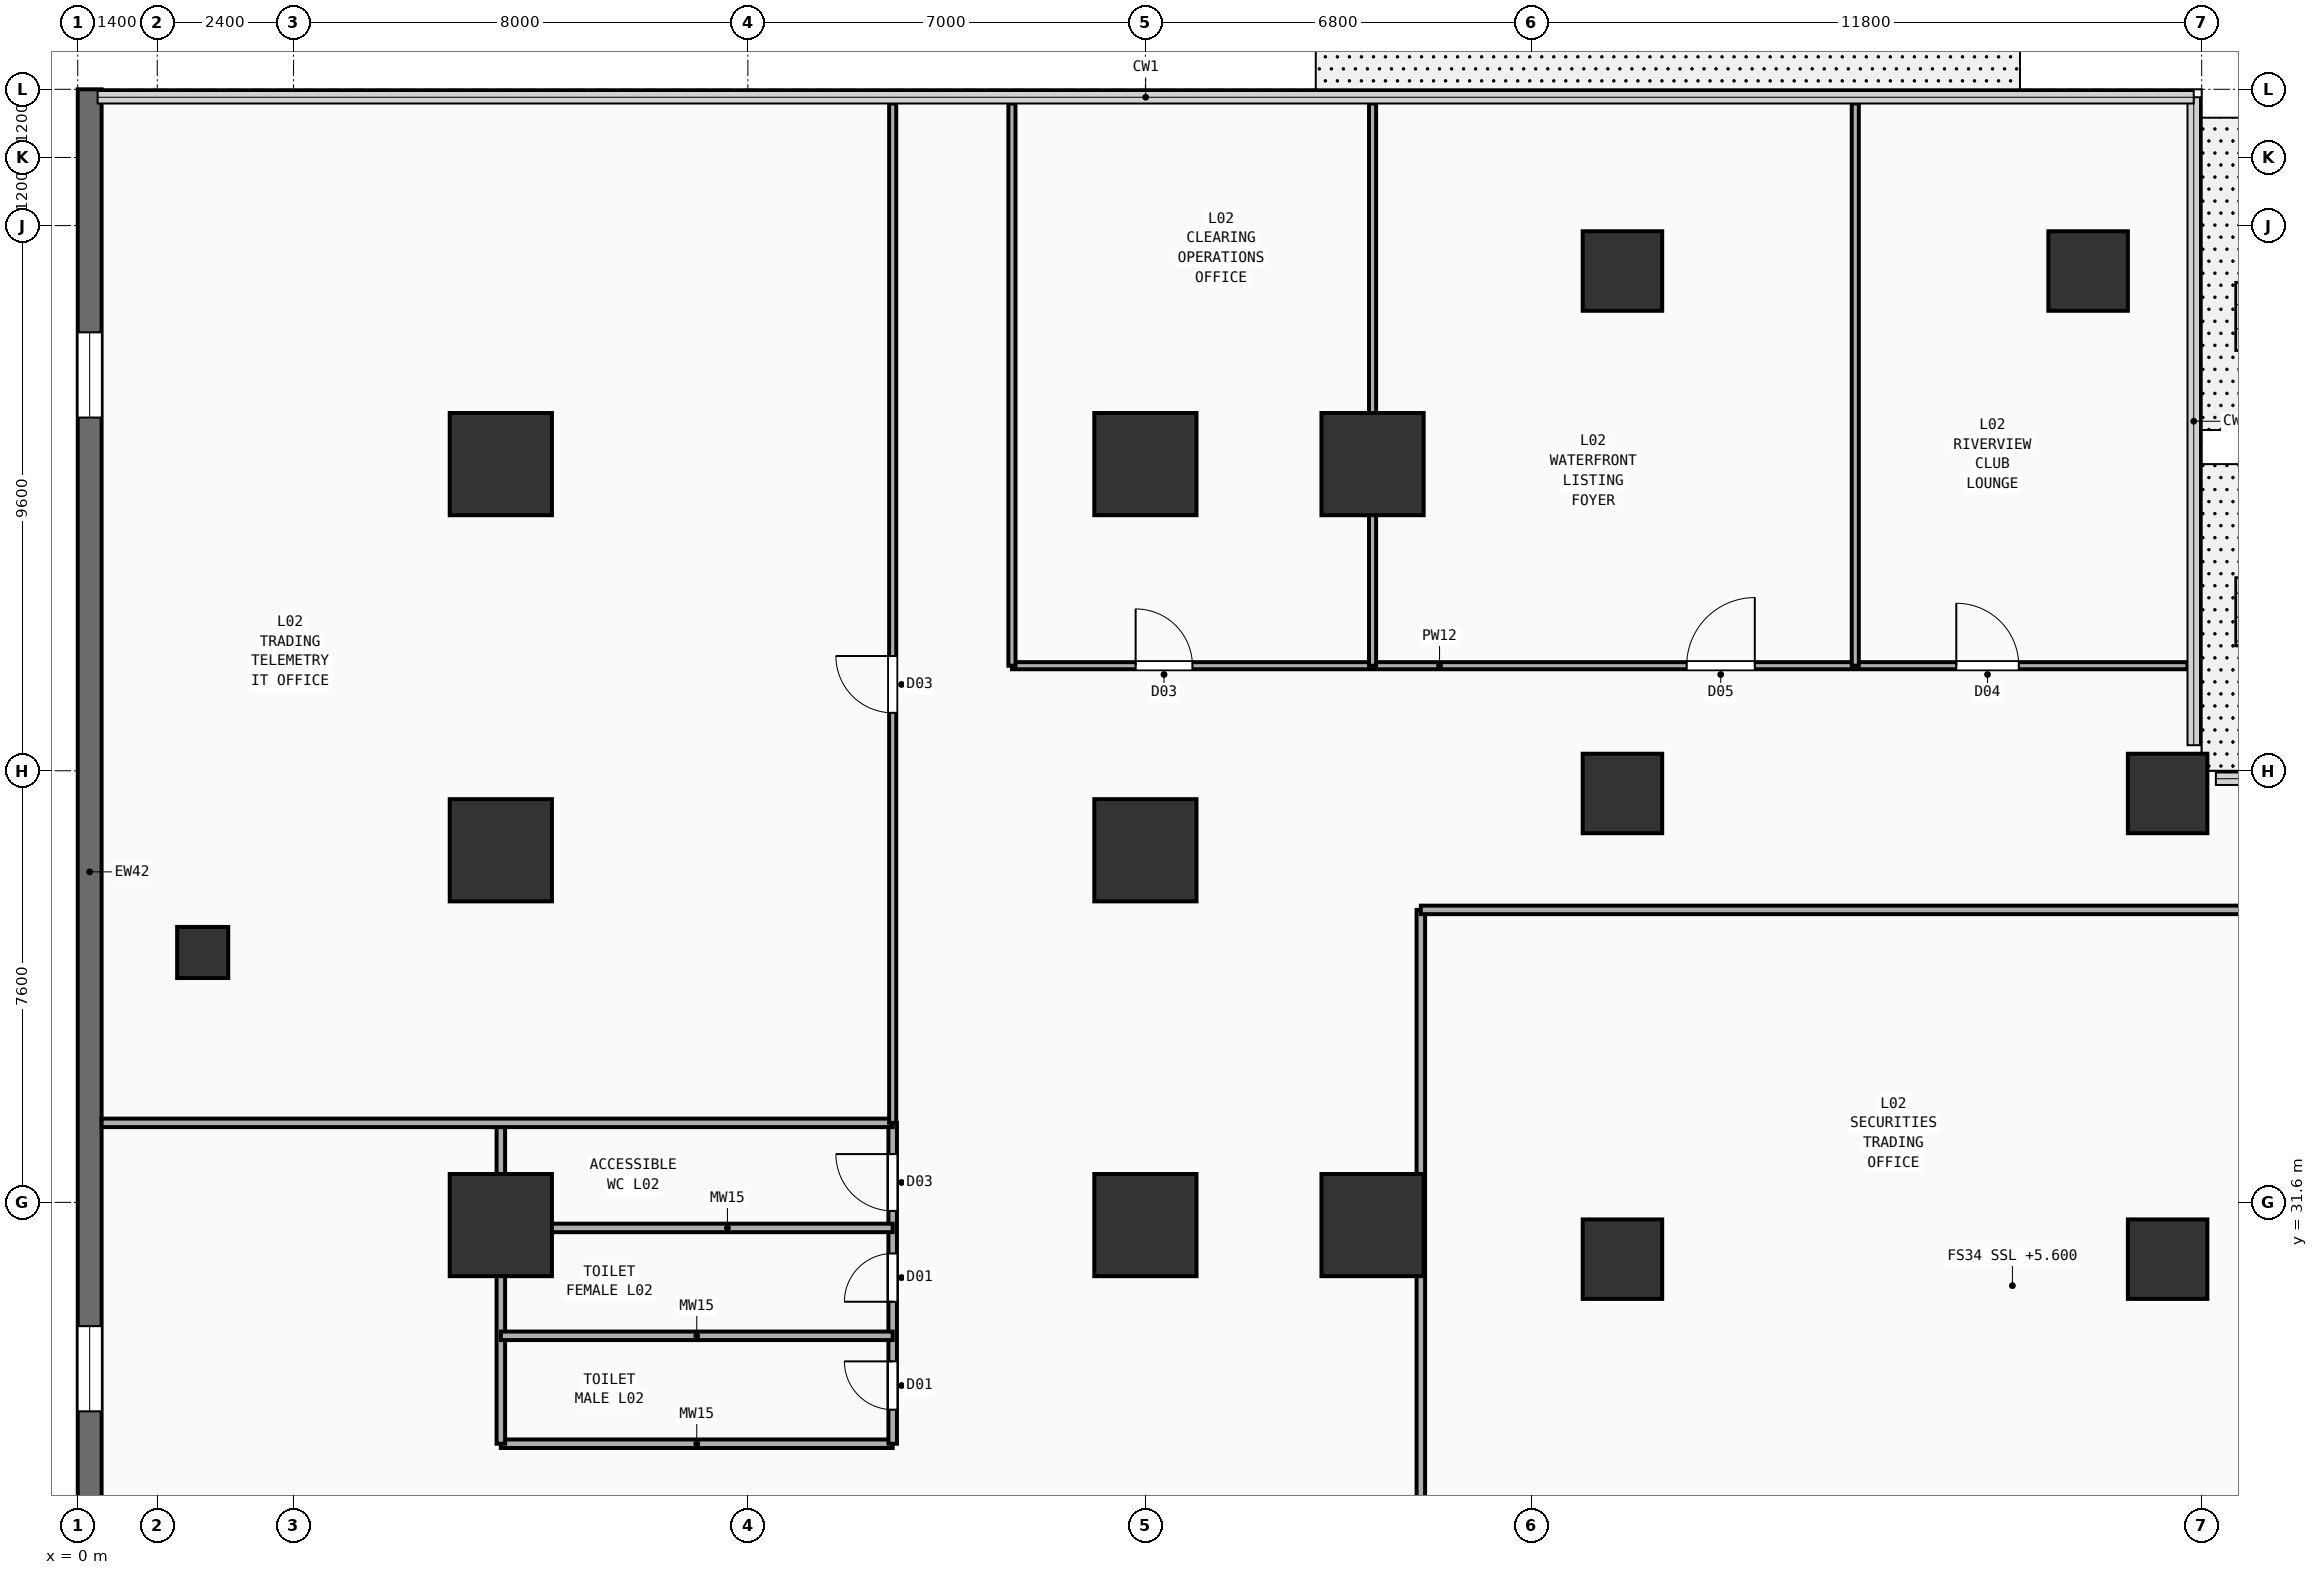
"""IFC4 building model, lengths in metres.
Left out: names, types, materials, properties, quantities, classifications, styles, units other than length and angle.
Written with IfcOpenShell. Run it as: python <this file> out.ifc"""

import sys

from ifc_helpers import new_model, si_unit, direction, frame, frame_2d, origin, origin_2d, place, context, subcontext, project, spatial, rectangle, extrude, element, fill, save


model = new_model("IFC4")
c1 = context("Model", 3, precision=1e-05, world=origin(), true_north=direction((0.0, 1.0)))
c2 = subcontext(c1, "Body", "Model", "MODEL_VIEW")
j1 = project(units=[si_unit("LENGTHUNIT", "METRE"), si_unit("PLANEANGLEUNIT", "RADIAN")], contexts=[c1])
p1 = place(None, origin())
s1 = spatial("IfcSite", under=j1, at=p1, CompositionType="ELEMENT")
p2 = place(p1, origin())
s2 = spatial("IfcBuilding", under=s1, at=p2, CompositionType="ELEMENT")
p3 = place(p2, frame((0.0, 0.0, 5.6)))
s3 = spatial("IfcBuildingStorey", under=s2, at=p3, CompositionType="ELEMENT", Elevation=5.6)
for number, where, z_axis, x_axis in (
    (1, (7.45, 31.2, 0.0), (0.0, 0.0, 1.0), (1.0, 0.0, 0.0)),
    (2, (7.45, 37.8, 0.0), (0.0, 0.0, 1.0), (1.0, 0.0, 0.0)),
    (3, (7.45, 44.6, 0.0), (0.0, 0.0, 1.0), (1.0, 0.0, 0.0)),
    (4, (18.8, 31.2, 0.0), (0.0, 0.0, 1.0), (1.0, 0.0, 0.0)),
    (5, (18.8, 37.8, 0.0), (0.0, 0.0, 1.0), (1.0, 0.0, 0.0)),
    (6, (18.8, 44.6, 0.0), (0.0, 0.0, 1.0), (1.0, 0.0, 0.0)),
    (7, (22.8, 31.2, 0.0), (0.0, 0.0, 1.0), (1.0, 0.0, 0.0)),
    (8, (22.8, 44.6, 0.0), (0.0, 0.0, 1.0), (1.0, 0.0, 0.0)),
):
    element("IfcColumn", number, at=place(p3, frame(where, z_axis=z_axis, x_axis=x_axis)), inside=s3, PredefinedType="COLUMN", context=c2, shape_type="SweptSolid", body=[
        extrude(rectangle(XDim=1.8, YDim=1.8, at=origin_2d()), origin(), (0.0, 0.0, 1.0), 4.46),
    ])
for number, where, z_axis, x_axis in (
    (9, (27.2, 30.6, 0.0), (0.0, 0.0, 1.0), (1.0, 0.0, 0.0)),
    (10, (36.8, 30.6, 0.0), (0.0, 0.0, 1.0), (1.0, 0.0, 0.0)),
    (11, (27.2, 38.8, 0.0), (0.0, 0.0, 1.0), (1.0, 0.0, 0.0)),
    (12, (36.8, 38.8, 0.0), (0.0, 0.0, 1.0), (1.0, 0.0, 0.0)),
    (13, (27.2, 48.0, 0.0), (0.0, 0.0, 1.0), (1.0, 0.0, 0.0)),
    (14, (35.4, 48.0, 0.0), (0.0, 0.0, 1.0), (1.0, 0.0, 0.0)),
):
    element("IfcColumn", number, at=place(p3, frame(where, z_axis=z_axis, x_axis=x_axis)), inside=s3, PredefinedType="COLUMN", context=c2, shape_type="SweptSolid", body=[
        extrude(rectangle(XDim=1.4, YDim=1.4, at=origin_2d()), origin(), (0.0, 0.0, 1.0), 4.46),
    ])
p4 = place(p3, frame((2.2, 36.0, 0.0), z_axis=(0.0, 0.0, 1.0), x_axis=(1.0, 0.0, 0.0)))
e15 = element("IfcColumn", 15, at=p4, inside=s3, PredefinedType="PILASTER", context=c2, shape_type="SweptSolid", body=[
    extrude(rectangle(XDim=0.9, YDim=0.9, at=origin_2d()), origin(), (0.0, 0.0, 1.0), 4.46),
])
p5 = place(p3, frame((0.21, 0.42, 0.0), z_axis=(0.0, 0.0, 1.0), x_axis=(0.0, 1.0, 0.0)))
e16 = element("IfcWall", 16, at=p5, inside=s3, PredefinedType="SOLIDWALL", context=c2, shape_type="SweptSolid", body=[
    extrude(rectangle(XDim=50.78, YDim=0.42, at=frame_2d((25.39, 0.0))), origin(), (0.0, 0.0, 1.0), 4.46),
])
p6 = place(p5, frame((8.0, 0.0, 0.95)))
e17 = element("IfcOpeningElement", 17, at=p6, cuts=e16, PredefinedType="OPENING", context=c2, shape_type="SweptSolid", body=[
    extrude(rectangle(XDim=1.5, YDim=1.8, at=frame_2d((0.75, 0.9))), frame((0.0, 0.22, 0.0), z_axis=(0.0, -1.0, 0.0), x_axis=(1.0, 0.0, 0.0)), (0.0, 0.0, 1.0), 0.44),
])
p7 = place(p5, frame((18.0, 0.0, 0.95)))
e18 = element("IfcOpeningElement", 18, at=p7, cuts=e16, PredefinedType="OPENING", context=c2, shape_type="SweptSolid", body=[
    extrude(rectangle(XDim=1.5, YDim=1.8, at=frame_2d((0.75, 0.9))), frame((0.0, 0.22, 0.0), z_axis=(0.0, -1.0, 0.0), x_axis=(1.0, 0.0, 0.0)), (0.0, 0.0, 1.0), 0.44),
])
p8 = place(p5, frame((27.5, 0.0, 0.95)))
e19 = element("IfcOpeningElement", 19, at=p8, cuts=e16, PredefinedType="OPENING", context=c2, shape_type="SweptSolid", body=[
    extrude(rectangle(XDim=1.5, YDim=1.8, at=frame_2d((0.75, 0.9))), frame((0.0, 0.22, 0.0), z_axis=(0.0, -1.0, 0.0), x_axis=(1.0, 0.0, 0.0)), (0.0, 0.0, 1.0), 0.44),
])
p9 = place(p5, frame((45.0, 0.0, 0.95)))
e20 = element("IfcOpeningElement", 20, at=p9, cuts=e16, PredefinedType="OPENING", context=c2, shape_type="SweptSolid", body=[
    extrude(rectangle(XDim=1.5, YDim=1.8, at=frame_2d((0.75, 0.9))), frame((0.0, 0.22, 0.0), z_axis=(0.0, -1.0, 0.0), x_axis=(1.0, 0.0, 0.0)), (0.0, 0.0, 1.0), 0.44),
])
p10 = place(p3, frame((7.45, 27.35, 0.0), z_axis=(0.0, 0.0, 1.0), x_axis=(1.0, 0.0, 0.0)))
e21 = element("IfcWall", 21, at=p10, inside=s3, PredefinedType="PLUMBINGWALL", context=c2, shape_type="SweptSolid", body=[
    extrude(rectangle(XDim=6.9, YDim=0.15, at=frame_2d((3.45, 0.0))), origin(), (0.0, 0.0, 1.0), 4.46),
])
p11 = place(p3, frame((7.45, 27.35, 0.0), z_axis=(0.0, 0.0, 1.0), x_axis=(0.0, 1.0, 0.0)))
e22 = element("IfcWall", 22, at=p11, inside=s3, PredefinedType="PLUMBINGWALL", context=c2, shape_type="SweptSolid", body=[
    extrude(rectangle(XDim=5.65, YDim=0.15, at=frame_2d((2.825, 0.0))), origin(), (0.0, 0.0, 1.0), 4.1),
])
p12 = place(p3, frame((14.35, 27.35, 0.0), z_axis=(0.0, 0.0, 1.0), x_axis=(0.0, 1.0, 0.0)))
e23 = element("IfcWall", 23, at=p12, inside=s3, PredefinedType="PLUMBINGWALL", context=c2, shape_type="SweptSolid", body=[
    extrude(rectangle(XDim=5.65, YDim=0.15, at=frame_2d((2.825, 0.0))), origin(), (0.0, 0.0, 1.0), 4.46),
])
p13 = place(p12, frame((0.6, 0.0, 0.0)))
e24 = element("IfcOpeningElement", 24, at=p13, cuts=e23, PredefinedType="OPENING", context=c2, shape_type="SweptSolid", body=[
    extrude(rectangle(XDim=0.85, YDim=2.15, at=frame_2d((0.425, 1.075))), frame((0.0, 0.085, 0.0), z_axis=(0.0, -1.0, 0.0), x_axis=(1.0, 0.0, 0.0)), (0.0, 0.0, 1.0), 0.17),
])
p14 = place(p12, frame((2.5, 0.0, 0.0)))
e25 = element("IfcOpeningElement", 25, at=p14, cuts=e23, PredefinedType="OPENING", context=c2, shape_type="SweptSolid", body=[
    extrude(rectangle(XDim=0.85, YDim=2.15, at=frame_2d((0.425, 1.075))), frame((0.0, 0.085, 0.0), z_axis=(0.0, -1.0, 0.0), x_axis=(1.0, 0.0, 0.0)), (0.0, 0.0, 1.0), 0.17),
])
p15 = place(p12, frame((4.1, 0.0, 0.0)))
e26 = element("IfcOpeningElement", 26, at=p15, cuts=e23, PredefinedType="OPENING", context=c2, shape_type="SweptSolid", body=[
    extrude(rectangle(XDim=1.0, YDim=2.2, at=frame_2d((0.5, 1.1))), frame((0.0, 0.085, 0.0), z_axis=(0.0, -1.0, 0.0), x_axis=(1.0, 0.0, 0.0)), (0.0, 0.0, 1.0), 0.17),
])
for number, where, z_axis, x_axis in (
    (27, (7.45, 29.25, 0.0), (0.0, 0.0, 1.0), (1.0, 0.0, 0.0)),
    (28, (7.45, 31.15, 0.0), (0.0, 0.0, 1.0), (1.0, 0.0, 0.0)),
):
    element("IfcWall", number, at=place(p3, frame(where, z_axis=z_axis, x_axis=x_axis)), inside=s3, PredefinedType="PLUMBINGWALL", context=c2, shape_type="SweptSolid", body=[
        extrude(rectangle(XDim=6.9, YDim=0.15, at=frame_2d((3.45, 0.0))), origin(), (0.0, 0.0, 1.0), 3.96),
    ])
p16 = place(p3, frame((0.42, 33.0, 0.0), z_axis=(0.0, 0.0, 1.0), x_axis=(1.0, 0.0, 0.0)))
e29 = element("IfcWall", 29, at=p16, inside=s3, PredefinedType="PLUMBINGWALL", context=c2, shape_type="SweptSolid", body=[
    extrude(rectangle(XDim=13.93, YDim=0.15, at=frame_2d((6.965, 0.0))), origin(), (0.0, 0.0, 1.0), 4.46),
])
p17 = place(p3, frame((23.65, 16.35, 0.0), z_axis=(0.0, 0.0, 1.0), x_axis=(0.0, 1.0, 0.0)))
e30 = element("IfcWall", 30, at=p17, inside=s3, PredefinedType="PARTITIONING", context=c2, shape_type="SweptSolid", body=[
    extrude(rectangle(XDim=20.4, YDim=0.15, at=frame_2d((10.2, 0.0))), origin(), (0.0, 0.0, 1.0), 4.46),
])
p18 = place(p3, frame((23.65, 36.75, 0.0), z_axis=(0.0, 0.0, 1.0), x_axis=(1.0, 0.0, 0.0)))
e31 = element("IfcWall", 31, at=p18, inside=s3, PredefinedType="PARTITIONING", context=c2, shape_type="SweptSolid", body=[
    extrude(rectangle(XDim=40.9, YDim=0.15, at=frame_2d((20.45, 0.0))), origin(), (0.0, 0.0, 1.0), 4.46),
])
p19 = place(p3, frame((14.35, 33.0, 0.0), z_axis=(0.0, 0.0, 1.0), x_axis=(0.0, 1.0, 0.0)))
e32 = element("IfcWall", 32, at=p19, inside=s3, PredefinedType="PARTITIONING", context=c2, shape_type="SweptSolid", body=[
    extrude(rectangle(XDim=17.95, YDim=0.125, at=frame_2d((8.975, 0.0))), origin(), (0.0, 0.0, 1.0), 4.46),
])
p20 = place(p19, frame((7.22, 0.0, 0.0)))
e33 = element("IfcOpeningElement", 33, at=p20, cuts=e32, PredefinedType="OPENING", context=c2, shape_type="SweptSolid", body=[
    extrude(rectangle(XDim=1.0, YDim=2.2, at=frame_2d((0.5, 1.1))), frame((0.0, 0.073, 0.0), z_axis=(0.0, -1.0, 0.0), x_axis=(1.0, 0.0, 0.0)), (0.0, 0.0, 1.0), 0.145),
])
p21 = place(p3, frame((16.45, 41.05, 0.0), z_axis=(0.0, 0.0, 1.0), x_axis=(1.0, 0.0, 0.0)))
e34 = element("IfcWall", 34, at=p21, inside=s3, PredefinedType="PARTITIONING", context=c2, shape_type="SweptSolid", body=[
    extrude(rectangle(XDim=20.7, YDim=0.125, at=frame_2d((10.35, 0.0))), origin(), (0.0, 0.0, 1.0), 4.46),
])
p22 = place(p21, frame((2.178, 0.0, 0.0)))
e35 = element("IfcOpeningElement", 35, at=p22, cuts=e34, PredefinedType="OPENING", context=c2, shape_type="SweptSolid", body=[
    extrude(rectangle(XDim=1.0, YDim=2.2, at=frame_2d((0.5, 1.1))), frame((0.0, 0.073, 0.0), z_axis=(0.0, -1.0, 0.0), x_axis=(1.0, 0.0, 0.0)), (0.0, 0.0, 1.0), 0.145),
])
p23 = place(p21, frame((11.881, 0.0, 0.0)))
e36 = element("IfcOpeningElement", 36, at=p23, cuts=e34, PredefinedType="OPENING", context=c2, shape_type="SweptSolid", body=[
    extrude(rectangle(XDim=1.2, YDim=2.25, at=frame_2d((0.6, 1.125))), frame((0.0, 0.073, 0.0), z_axis=(0.0, -1.0, 0.0), x_axis=(1.0, 0.0, 0.0)), (0.0, 0.0, 1.0), 0.145),
])
p24 = place(p21, frame((16.629, 0.0, 0.0)))
e37 = element("IfcOpeningElement", 37, at=p24, cuts=e34, PredefinedType="OPENING", context=c2, shape_type="SweptSolid", body=[
    extrude(rectangle(XDim=1.1, YDim=2.2, at=frame_2d((0.55, 1.1))), frame((0.0, 0.073, 0.0), z_axis=(0.0, -1.0, 0.0), x_axis=(1.0, 0.0, 0.0)), (0.0, 0.0, 1.0), 0.145),
])
for number, where, z_axis, x_axis in (
    (38, (16.45, 41.05, 0.0), (0.0, 0.0, 1.0), (0.0, 1.0, 0.0)),
    (39, (22.8, 41.05, 0.0), (0.0, 0.0, 1.0), (0.0, 1.0, 0.0)),
    (40, (31.3, 41.05, 0.0), (0.0, 0.0, 1.0), (0.0, 1.0, 0.0)),
):
    element("IfcWall", number, at=place(p3, frame(where, z_axis=z_axis, x_axis=x_axis)), inside=s3, PredefinedType="PARTITIONING", context=c2, shape_type="SweptSolid", body=[
        extrude(rectangle(XDim=9.9, YDim=0.125, at=frame_2d((4.95, 0.0))), origin(), (0.0, 0.0, 1.0), 4.46),
    ])
p25 = place(p8, origin())
e41 = element("IfcWindow", 41, at=p25, inside=s3, PartitioningType="SINGLE_PANEL", PredefinedType="WINDOW", context=c2, shape_type="SweptSolid", body=[
    extrude(rectangle(XDim=1.5, YDim=1.8, at=frame_2d((0.75, 0.9))), frame((0.0, 0.03, 0.0), z_axis=(0.0, -1.0, 0.0), x_axis=(1.0, 0.0, 0.0)), (0.0, 0.0, 1.0), 0.06),
])
fill(e19, e41)
p26 = place(p9, origin())
e42 = element("IfcWindow", 42, at=p26, inside=s3, PartitioningType="SINGLE_PANEL", PredefinedType="WINDOW", context=c2, shape_type="SweptSolid", body=[
    extrude(rectangle(XDim=1.5, YDim=1.8, at=frame_2d((0.75, 0.9))), frame((0.0, 0.03, 0.0), z_axis=(0.0, -1.0, 0.0), x_axis=(1.0, 0.0, 0.0)), (0.0, 0.0, 1.0), 0.06),
])
fill(e20, e42)
p27 = place(p3, frame((0.0, 0.0, -0.21)))
p28 = place(p27, frame((38.6, 42.0, 0.0)))
p29 = place(p28, frame((0.0, 0.0, 0.16)))
e43 = element("IfcWindow", 43, at=p29, inside=s3, PartitioningType="SINGLE_PANEL", PredefinedType="SKYLIGHT", context=c2, shape_type="SweptSolid", body=[
    extrude(rectangle(XDim=1.2, YDim=1.2, at=origin_2d()), origin(), (0.0, 0.0, 1.0), 0.05),
])
p30 = place(p3, frame((0.0, 0.0, -0.21)))
p31 = place(p30, frame((38.6, 47.2, 0.0)))
p32 = place(p31, frame((0.0, 0.0, 0.16)))
e44 = element("IfcWindow", 44, at=p32, inside=s3, PartitioningType="SINGLE_PANEL", PredefinedType="SKYLIGHT", context=c2, shape_type="SweptSolid", body=[
    extrude(rectangle(XDim=1.2, YDim=1.2, at=origin_2d()), origin(), (0.0, 0.0, 1.0), 0.05),
])
p33 = place(p13, origin())
e45 = element("IfcDoor", 45, at=p33, inside=s3, OperationType="SINGLE_SWING_RIGHT", PredefinedType="DOOR", context=c2, shape_type="SweptSolid", body=[
    extrude(rectangle(XDim=0.85, YDim=2.15, at=frame_2d((0.425, 1.075))), frame((0.0, 0.025, 0.0), z_axis=(0.0, -1.0, 0.0), x_axis=(1.0, 0.0, 0.0)), (0.0, 0.0, 1.0), 0.05),
])
fill(e24, e45)
p34 = place(p14, origin())
e46 = element("IfcDoor", 46, at=p34, inside=s3, OperationType="SINGLE_SWING_LEFT", PredefinedType="DOOR", context=c2, shape_type="SweptSolid", body=[
    extrude(rectangle(XDim=0.85, YDim=2.15, at=frame_2d((0.425, 1.075))), frame((0.0, 0.025, 0.0), z_axis=(0.0, -1.0, 0.0), x_axis=(1.0, 0.0, 0.0)), (0.0, 0.0, 1.0), 0.05),
])
fill(e25, e46)
p35 = place(p15, origin())
e47 = element("IfcDoor", 47, at=p35, inside=s3, OperationType="SINGLE_SWING_RIGHT", PredefinedType="DOOR", context=c2, shape_type="SweptSolid", body=[
    extrude(rectangle(XDim=1.0, YDim=2.2, at=frame_2d((0.5, 1.1))), frame((0.0, 0.025, 0.0), z_axis=(0.0, -1.0, 0.0), x_axis=(1.0, 0.0, 0.0)), (0.0, 0.0, 1.0), 0.05),
])
fill(e26, e47)
p36 = place(p20, origin())
e48 = element("IfcDoor", 48, at=p36, inside=s3, OperationType="SINGLE_SWING_RIGHT", PredefinedType="DOOR", context=c2, shape_type="SweptSolid", body=[
    extrude(rectangle(XDim=1.0, YDim=2.2, at=frame_2d((0.5, 1.1))), frame((0.0, 0.025, 0.0), z_axis=(0.0, -1.0, 0.0), x_axis=(1.0, 0.0, 0.0)), (0.0, 0.0, 1.0), 0.05),
])
fill(e33, e48)
p37 = place(p22, origin())
e49 = element("IfcDoor", 49, at=p37, inside=s3, OperationType="SINGLE_SWING_LEFT", PredefinedType="DOOR", context=c2, shape_type="SweptSolid", body=[
    extrude(rectangle(XDim=1.0, YDim=2.2, at=frame_2d((0.5, 1.1))), frame((0.0, 0.025, 0.0), z_axis=(0.0, -1.0, 0.0), x_axis=(1.0, 0.0, 0.0)), (0.0, 0.0, 1.0), 0.05),
])
fill(e35, e49)
p38 = place(p23, origin())
e50 = element("IfcDoor", 50, at=p38, inside=s3, OperationType="SINGLE_SWING_RIGHT", PredefinedType="DOOR", context=c2, shape_type="SweptSolid", body=[
    extrude(rectangle(XDim=1.2, YDim=2.25, at=frame_2d((0.6, 1.125))), frame((0.0, 0.025, 0.0), z_axis=(0.0, -1.0, 0.0), x_axis=(1.0, 0.0, 0.0)), (0.0, 0.0, 1.0), 0.05),
])
fill(e36, e50)
p39 = place(p24, origin())
e51 = element("IfcDoor", 51, at=p39, inside=s3, OperationType="SINGLE_SWING_LEFT", PredefinedType="DOOR", context=c2, shape_type="SweptSolid", body=[
    extrude(rectangle(XDim=1.1, YDim=2.2, at=frame_2d((0.55, 1.1))), frame((0.0, 0.025, 0.0), z_axis=(0.0, -1.0, 0.0), x_axis=(1.0, 0.0, 0.0)), (0.0, 0.0, 1.0), 0.05),
])
fill(e37, e51)
save(model, sys.argv[1])
